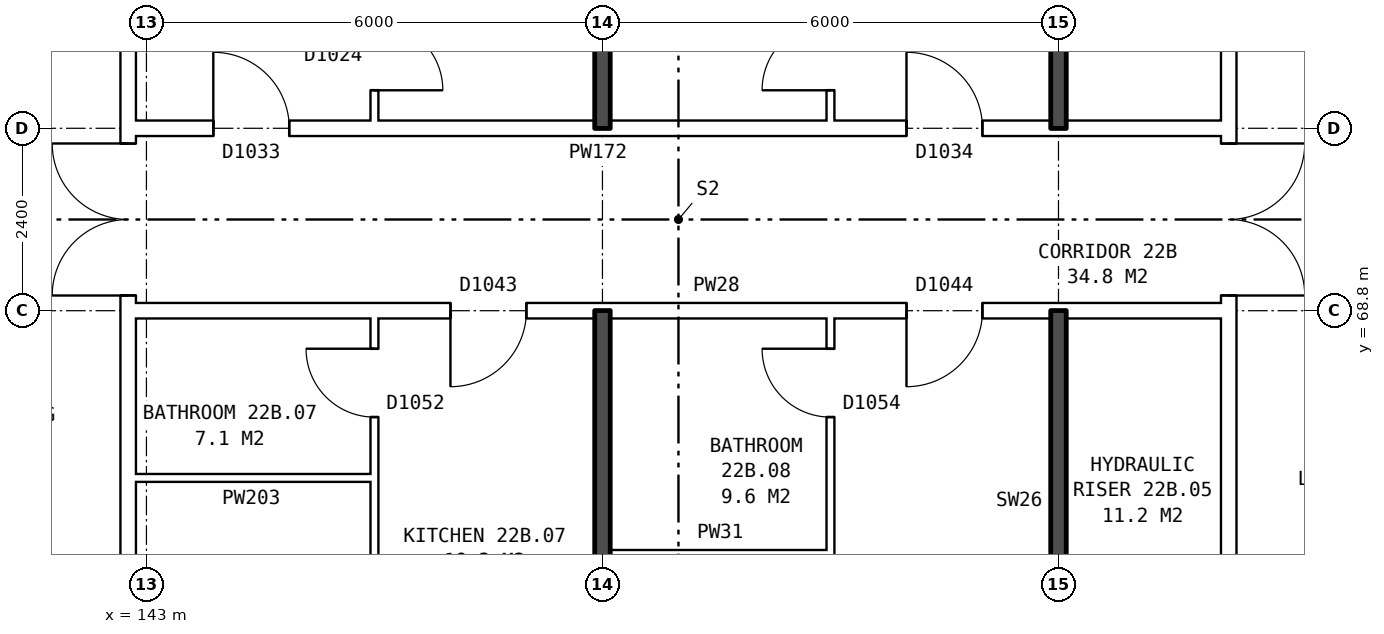
"""IFC4 building model, lengths in metres.
Left out: names, types, materials, properties, quantities, classifications, styles, units other than length and angle.
Written with IfcOpenShell. Run it as: python <this file> out.ifc"""

import sys

from ifc_helpers import new_model, si_unit, direction, frame, frame_2d, origin, place, context, subcontext, project, spatial, rectangle, extrude, element, fill, save


model = new_model("IFC4")
c1 = context("Model", 3, precision=1e-05, world=origin(), true_north=direction((0.0, 1.0)))
c2 = subcontext(c1, "Body", "Model", "MODEL_VIEW")
j1 = project(units=[si_unit("LENGTHUNIT", "METRE"), si_unit("PLANEANGLEUNIT", "RADIAN")], contexts=[c1])
p1 = place(None, origin())
s1 = spatial("IfcSite", under=j1, at=p1, CompositionType="ELEMENT")
p2 = place(p1, origin())
s2 = spatial("IfcBuilding", under=s1, at=p2, CompositionType="ELEMENT")
p3 = place(p2, frame((0.0, 0.0, 80.9)))
s3 = spatial("IfcBuildingStorey", under=s2, at=p3, CompositionType="ELEMENT", Elevation=80.9)
p4 = place(p3, frame((142.76, 63.9, 0.0), z_axis=(0.0, 0.0, 1.0), x_axis=(0.0, 1.0, 0.0)))
e1 = element("IfcWall", 1, at=p4, inside=s3, PredefinedType="PARTITIONING", context=c2, shape_type="SweptSolid", body=[
    extrude(rectangle(XDim=12.2, YDim=0.2, at=frame_2d((6.1, 0.0))), origin(), (0.0, 0.0, 1.0), 2.85),
])
p5 = place(p4, frame((5.1, 0.0, 0.0)))
e2 = element("IfcOpeningElement", 2, at=p5, cuts=e1, PredefinedType="OPENING", context=c2, shape_type="SweptSolid", body=[
    extrude(rectangle(XDim=2.0, YDim=2.1, at=frame_2d((1.0, 1.05))), frame((0.0, 0.11, 0.0), z_axis=(0.0, -1.0, 0.0), x_axis=(1.0, 0.0, 0.0)), (0.0, 0.0, 1.0), 0.22),
])
p6 = place(p3, frame((157.24, 63.9, 0.0), z_axis=(0.0, 0.0, 1.0), x_axis=(0.0, 1.0, 0.0)))
e3 = element("IfcWall", 3, at=p6, inside=s3, PredefinedType="PARTITIONING", context=c2, shape_type="SweptSolid", body=[
    extrude(rectangle(XDim=12.2, YDim=0.2, at=frame_2d((6.1, 0.0))), origin(), (0.0, 0.0, 1.0), 2.85),
])
p7 = place(p6, frame((5.1, 0.0, 0.0)))
e4 = element("IfcOpeningElement", 4, at=p7, cuts=e3, PredefinedType="OPENING", context=c2, shape_type="SweptSolid", body=[
    extrude(rectangle(XDim=2.0, YDim=2.1, at=frame_2d((1.0, 1.05))), frame((0.0, 0.11, 0.0), z_axis=(0.0, -1.0, 0.0), x_axis=(1.0, 0.0, 0.0)), (0.0, 0.0, 1.0), 0.22),
])
p8 = place(p3, frame((149.1, 65.6, 0.0), z_axis=(0.0, 0.0, 1.0), x_axis=(1.0, 0.0, 0.0)))
e5 = element("IfcWall", 5, at=p8, inside=s3, PredefinedType="PARTITIONING", context=c2, shape_type="SweptSolid", body=[
    extrude(rectangle(XDim=2.9, YDim=0.1, at=frame_2d((1.45, 0.0))), origin(), (0.0, 0.0, 1.0), 2.85),
])
p9 = place(p3, frame((142.76, 66.6, 0.0), z_axis=(0.0, 0.0, 1.0), x_axis=(1.0, 0.0, 0.0)))
e6 = element("IfcWall", 6, at=p9, inside=s3, PredefinedType="PARTITIONING", context=c2, shape_type="SweptSolid", body=[
    extrude(rectangle(XDim=3.24, YDim=0.1, at=frame_2d((1.62, 0.0))), origin(), (0.0, 0.0, 1.0), 2.85),
])
p10 = place(p3, frame((142.76, 68.8, 0.0), z_axis=(0.0, 0.0, 1.0), x_axis=(1.0, 0.0, 0.0)))
e7 = element("IfcWall", 7, at=p10, inside=s3, PredefinedType="PARTITIONING", context=c2, shape_type="SweptSolid", body=[
    extrude(rectangle(XDim=14.48, YDim=0.2, at=frame_2d((7.24, 0.0))), origin(), (0.0, 0.0, 1.0), 2.85),
])
p11 = place(p10, frame((4.24, 0.0, 0.0)))
e8 = element("IfcOpeningElement", 8, at=p11, cuts=e7, PredefinedType="OPENING", context=c2, shape_type="SweptSolid", body=[
    extrude(rectangle(XDim=1.0, YDim=2.1, at=frame_2d((0.5, 1.05))), frame((0.0, 0.11, 0.0), z_axis=(0.0, -1.0, 0.0), x_axis=(1.0, 0.0, 0.0)), (0.0, 0.0, 1.0), 0.22),
])
p12 = place(p10, frame((10.24, 0.0, 0.0)))
e9 = element("IfcOpeningElement", 9, at=p12, cuts=e7, PredefinedType="OPENING", context=c2, shape_type="SweptSolid", body=[
    extrude(rectangle(XDim=1.0, YDim=2.1, at=frame_2d((0.5, 1.05))), frame((0.0, 0.11, 0.0), z_axis=(0.0, -1.0, 0.0), x_axis=(1.0, 0.0, 0.0)), (0.0, 0.0, 1.0), 0.22),
])
p13 = place(p3, frame((142.76, 71.2, 0.0), z_axis=(0.0, 0.0, 1.0), x_axis=(1.0, 0.0, 0.0)))
e10 = element("IfcWall", 10, at=p13, inside=s3, PredefinedType="PARTITIONING", context=c2, shape_type="SweptSolid", body=[
    extrude(rectangle(XDim=14.48, YDim=0.2, at=frame_2d((7.24, 0.0))), origin(), (0.0, 0.0, 1.0), 2.85),
])
p14 = place(p13, frame((1.12, 0.0, 0.0)))
e11 = element("IfcOpeningElement", 11, at=p14, cuts=e10, PredefinedType="OPENING", context=c2, shape_type="SweptSolid", body=[
    extrude(rectangle(XDim=1.0, YDim=2.1, at=frame_2d((0.5, 1.05))), frame((0.0, 0.11, 0.0), z_axis=(0.0, -1.0, 0.0), x_axis=(1.0, 0.0, 0.0)), (0.0, 0.0, 1.0), 0.22),
])
p15 = place(p13, frame((10.24, 0.0, 0.0)))
e12 = element("IfcOpeningElement", 12, at=p15, cuts=e10, PredefinedType="OPENING", context=c2, shape_type="SweptSolid", body=[
    extrude(rectangle(XDim=1.0, YDim=2.1, at=frame_2d((0.5, 1.05))), frame((0.0, 0.11, 0.0), z_axis=(0.0, -1.0, 0.0), x_axis=(1.0, 0.0, 0.0)), (0.0, 0.0, 1.0), 0.22),
])
p16 = place(p3, frame((146.0, 54.36, 0.0), z_axis=(0.0, 0.0, 1.0), x_axis=(0.0, 1.0, 0.0)))
e13 = element("IfcWall", 13, at=p16, inside=s3, PredefinedType="PARTITIONING", context=c2, shape_type="SweptSolid", body=[
    extrude(rectangle(XDim=14.34, YDim=0.1, at=frame_2d((7.17, 0.0))), origin(), (0.0, 0.0, 1.0), 2.85),
])
p17 = place(p16, frame((6.7, 0.0, 0.0)))
e14 = element("IfcOpeningElement", 14, at=p17, cuts=e13, PredefinedType="OPENING", context=c2, shape_type="SweptSolid", body=[
    extrude(rectangle(XDim=0.9, YDim=2.1, at=frame_2d((0.45, 1.05))), frame((0.0, 0.06, 0.0), z_axis=(0.0, -1.0, 0.0), x_axis=(1.0, 0.0, 0.0)), (0.0, 0.0, 1.0), 0.12),
])
p18 = place(p16, frame((13.04, 0.0, 0.0)))
e15 = element("IfcOpeningElement", 15, at=p18, cuts=e13, PredefinedType="OPENING", context=c2, shape_type="SweptSolid", body=[
    extrude(rectangle(XDim=0.9, YDim=2.1, at=frame_2d((0.45, 1.05))), frame((0.0, 0.06, 0.0), z_axis=(0.0, -1.0, 0.0), x_axis=(1.0, 0.0, 0.0)), (0.0, 0.0, 1.0), 0.12),
])
p19 = place(p3, frame((146.0, 71.3, 0.0), z_axis=(0.0, 0.0, 1.0), x_axis=(0.0, 1.0, 0.0)))
e16 = element("IfcWall", 16, at=p19, inside=s3, PredefinedType="PARTITIONING", context=c2, shape_type="SweptSolid", body=[
    extrude(rectangle(XDim=14.34, YDim=0.1, at=frame_2d((7.17, 0.0))), origin(), (0.0, 0.0, 1.0), 2.85),
])
p20 = place(p19, frame((5.74, 0.0, 0.0)))
e17 = element("IfcOpeningElement", 17, at=p20, cuts=e16, PredefinedType="OPENING", context=c2, shape_type="SweptSolid", body=[
    extrude(rectangle(XDim=0.9, YDim=2.1, at=frame_2d((0.45, 1.05))), frame((0.0, 0.06, 0.0), z_axis=(0.0, -1.0, 0.0), x_axis=(1.0, 0.0, 0.0)), (0.0, 0.0, 1.0), 0.12),
])
p21 = place(p19, frame((0.4, 0.0, 0.0)))
e18 = element("IfcOpeningElement", 18, at=p21, cuts=e16, PredefinedType="OPENING", context=c2, shape_type="SweptSolid", body=[
    extrude(rectangle(XDim=0.9, YDim=2.1, at=frame_2d((0.45, 1.05))), frame((0.0, 0.06, 0.0), z_axis=(0.0, -1.0, 0.0), x_axis=(1.0, 0.0, 0.0)), (0.0, 0.0, 1.0), 0.12),
])
for number, where, z_axis, x_axis in (
    (19, (149.0, 54.36, 0.0), (0.0, 0.0, 1.0), (0.0, 1.0, 0.0)),
    (20, (149.0, 71.2, 0.0), (0.0, 0.0, 1.0), (0.0, 1.0, 0.0)),
):
    element("IfcWall", number, at=place(p3, frame(where, z_axis=z_axis, x_axis=x_axis)), inside=s3, PredefinedType="SOLIDWALL", context=c2, shape_type="SweptSolid", body=[
        extrude(rectangle(XDim=14.44, YDim=0.2, at=frame_2d((7.22, 0.0))), origin(), (0.0, 0.0, 1.0), 2.85),
    ])
p22 = place(p3, frame((152.0, 54.36, 0.0), z_axis=(0.0, 0.0, 1.0), x_axis=(0.0, 1.0, 0.0)))
e21 = element("IfcWall", 21, at=p22, inside=s3, PredefinedType="PARTITIONING", context=c2, shape_type="SweptSolid", body=[
    extrude(rectangle(XDim=14.34, YDim=0.1, at=frame_2d((7.17, 0.0))), origin(), (0.0, 0.0, 1.0), 2.85),
])
p23 = place(p22, frame((6.7, 0.0, 0.0)))
e22 = element("IfcOpeningElement", 22, at=p23, cuts=e21, PredefinedType="OPENING", context=c2, shape_type="SweptSolid", body=[
    extrude(rectangle(XDim=0.9, YDim=2.1, at=frame_2d((0.45, 1.05))), frame((0.0, 0.06, 0.0), z_axis=(0.0, -1.0, 0.0), x_axis=(1.0, 0.0, 0.0)), (0.0, 0.0, 1.0), 0.12),
])
p24 = place(p22, frame((13.04, 0.0, 0.0)))
e23 = element("IfcOpeningElement", 23, at=p24, cuts=e21, PredefinedType="OPENING", context=c2, shape_type="SweptSolid", body=[
    extrude(rectangle(XDim=0.9, YDim=2.1, at=frame_2d((0.45, 1.05))), frame((0.0, 0.06, 0.0), z_axis=(0.0, -1.0, 0.0), x_axis=(1.0, 0.0, 0.0)), (0.0, 0.0, 1.0), 0.12),
])
p25 = place(p3, frame((152.0, 71.3, 0.0), z_axis=(0.0, 0.0, 1.0), x_axis=(0.0, 1.0, 0.0)))
e24 = element("IfcWall", 24, at=p25, inside=s3, PredefinedType="PARTITIONING", context=c2, shape_type="SweptSolid", body=[
    extrude(rectangle(XDim=14.34, YDim=0.1, at=frame_2d((7.17, 0.0))), origin(), (0.0, 0.0, 1.0), 2.85),
])
p26 = place(p25, frame((9.24, 0.0, 0.0)))
e25 = element("IfcOpeningElement", 25, at=p26, cuts=e24, PredefinedType="OPENING", context=c2, shape_type="SweptSolid", body=[
    extrude(rectangle(XDim=0.9, YDim=2.1, at=frame_2d((0.45, 1.05))), frame((0.0, 0.06, 0.0), z_axis=(0.0, -1.0, 0.0), x_axis=(1.0, 0.0, 0.0)), (0.0, 0.0, 1.0), 0.12),
])
p27 = place(p25, frame((0.4, 0.0, 0.0)))
e26 = element("IfcOpeningElement", 26, at=p27, cuts=e24, PredefinedType="OPENING", context=c2, shape_type="SweptSolid", body=[
    extrude(rectangle(XDim=0.9, YDim=2.1, at=frame_2d((0.45, 1.05))), frame((0.0, 0.06, 0.0), z_axis=(0.0, -1.0, 0.0), x_axis=(1.0, 0.0, 0.0)), (0.0, 0.0, 1.0), 0.12),
])
for number, where, z_axis, x_axis in (
    (27, (155.0, 63.8, 0.0), (0.0, 0.0, 1.0), (0.0, 1.0, 0.0)),
    (28, (155.0, 71.2, 0.0), (0.0, 0.0, 1.0), (0.0, 1.0, 0.0)),
):
    element("IfcWall", number, at=place(p3, frame(where, z_axis=z_axis, x_axis=x_axis)), inside=s3, PredefinedType="SOLIDWALL", context=c2, shape_type="SweptSolid", body=[
        extrude(rectangle(XDim=5.0, YDim=0.2, at=frame_2d((2.5, 0.0))), origin(), (0.0, 0.0, 1.0), 2.85),
    ])
p28 = place(p5, origin())
e29 = element("IfcDoor", 29, at=p28, inside=s3, OperationType="DOUBLE_DOOR_SINGLE_SWING", PredefinedType="DOOR", context=c2, shape_type="SweptSolid", body=[
    extrude(rectangle(XDim=2.0, YDim=2.1, at=frame_2d((1.0, 1.05))), frame((0.0, 0.025, 0.0), z_axis=(0.0, -1.0, 0.0), x_axis=(1.0, 0.0, 0.0)), (0.0, 0.0, 1.0), 0.05),
])
fill(e2, e29)
p29 = place(p7, frame((2.0, 0.0, 0.0), z_axis=(0.0, 0.0, 1.0), x_axis=(-1.0, 0.0, 0.0)))
e30 = element("IfcDoor", 30, at=p29, inside=s3, OperationType="DOUBLE_DOOR_SINGLE_SWING", PredefinedType="DOOR", context=c2, shape_type="SweptSolid", body=[
    extrude(rectangle(XDim=2.0, YDim=2.1, at=frame_2d((1.0, 1.05))), frame((0.0, 0.025, 0.0), z_axis=(0.0, -1.0, 0.0), x_axis=(1.0, 0.0, 0.0)), (0.0, 0.0, 1.0), 0.05),
])
fill(e4, e30)
p30 = place(p11, frame((1.0, 0.0, 0.0), z_axis=(0.0, 0.0, 1.0), x_axis=(-1.0, 0.0, 0.0)))
e31 = element("IfcDoor", 31, at=p30, inside=s3, OperationType="SINGLE_SWING_RIGHT", PredefinedType="DOOR", context=c2, shape_type="SweptSolid", body=[
    extrude(rectangle(XDim=1.0, YDim=2.1, at=frame_2d((0.5, 1.05))), frame((0.0, 0.025, 0.0), z_axis=(0.0, -1.0, 0.0), x_axis=(1.0, 0.0, 0.0)), (0.0, 0.0, 1.0), 0.05),
])
fill(e8, e31)
p31 = place(p18, origin())
e32 = element("IfcDoor", 32, at=p31, inside=s3, OperationType="SINGLE_SWING_RIGHT", PredefinedType="DOOR", context=c2, shape_type="SweptSolid", body=[
    extrude(rectangle(XDim=0.9, YDim=2.1, at=frame_2d((0.45, 1.05))), frame((0.0, 0.025, 0.0), z_axis=(0.0, -1.0, 0.0), x_axis=(1.0, 0.0, 0.0)), (0.0, 0.0, 1.0), 0.05),
])
fill(e15, e32)
p32 = place(p12, frame((1.0, 0.0, 0.0), z_axis=(0.0, 0.0, 1.0), x_axis=(-1.0, 0.0, 0.0)))
e33 = element("IfcDoor", 33, at=p32, inside=s3, OperationType="SINGLE_SWING_RIGHT", PredefinedType="DOOR", context=c2, shape_type="SweptSolid", body=[
    extrude(rectangle(XDim=1.0, YDim=2.1, at=frame_2d((0.5, 1.05))), frame((0.0, 0.025, 0.0), z_axis=(0.0, -1.0, 0.0), x_axis=(1.0, 0.0, 0.0)), (0.0, 0.0, 1.0), 0.05),
])
fill(e9, e33)
p33 = place(p24, origin())
e34 = element("IfcDoor", 34, at=p33, inside=s3, OperationType="SINGLE_SWING_RIGHT", PredefinedType="DOOR", context=c2, shape_type="SweptSolid", body=[
    extrude(rectangle(XDim=0.9, YDim=2.1, at=frame_2d((0.45, 1.05))), frame((0.0, 0.025, 0.0), z_axis=(0.0, -1.0, 0.0), x_axis=(1.0, 0.0, 0.0)), (0.0, 0.0, 1.0), 0.05),
])
fill(e23, e34)
p34 = place(p14, origin())
e35 = element("IfcDoor", 35, at=p34, inside=s3, OperationType="SINGLE_SWING_LEFT", PredefinedType="DOOR", context=c2, shape_type="SweptSolid", body=[
    extrude(rectangle(XDim=1.0, YDim=2.1, at=frame_2d((0.5, 1.05))), frame((0.0, 0.025, 0.0), z_axis=(0.0, -1.0, 0.0), x_axis=(1.0, 0.0, 0.0)), (0.0, 0.0, 1.0), 0.05),
])
fill(e11, e35)
p35 = place(p21, frame((0.9, 0.0, 0.0), z_axis=(0.0, 0.0, 1.0), x_axis=(-1.0, 0.0, 0.0)))
e36 = element("IfcDoor", 36, at=p35, inside=s3, OperationType="SINGLE_SWING_RIGHT", PredefinedType="DOOR", context=c2, shape_type="SweptSolid", body=[
    extrude(rectangle(XDim=0.9, YDim=2.1, at=frame_2d((0.45, 1.05))), frame((0.0, 0.025, 0.0), z_axis=(0.0, -1.0, 0.0), x_axis=(1.0, 0.0, 0.0)), (0.0, 0.0, 1.0), 0.05),
])
fill(e18, e36)
p36 = place(p15, origin())
e37 = element("IfcDoor", 37, at=p36, inside=s3, OperationType="SINGLE_SWING_LEFT", PredefinedType="DOOR", context=c2, shape_type="SweptSolid", body=[
    extrude(rectangle(XDim=1.0, YDim=2.1, at=frame_2d((0.5, 1.05))), frame((0.0, 0.025, 0.0), z_axis=(0.0, -1.0, 0.0), x_axis=(1.0, 0.0, 0.0)), (0.0, 0.0, 1.0), 0.05),
])
fill(e12, e37)
p37 = place(p27, origin())
e38 = element("IfcDoor", 38, at=p37, inside=s3, OperationType="SINGLE_SWING_LEFT", PredefinedType="DOOR", context=c2, shape_type="SweptSolid", body=[
    extrude(rectangle(XDim=0.9, YDim=2.1, at=frame_2d((0.45, 1.05))), frame((0.0, 0.025, 0.0), z_axis=(0.0, -1.0, 0.0), x_axis=(1.0, 0.0, 0.0)), (0.0, 0.0, 1.0), 0.05),
])
fill(e26, e38)
save(model, sys.argv[1])
